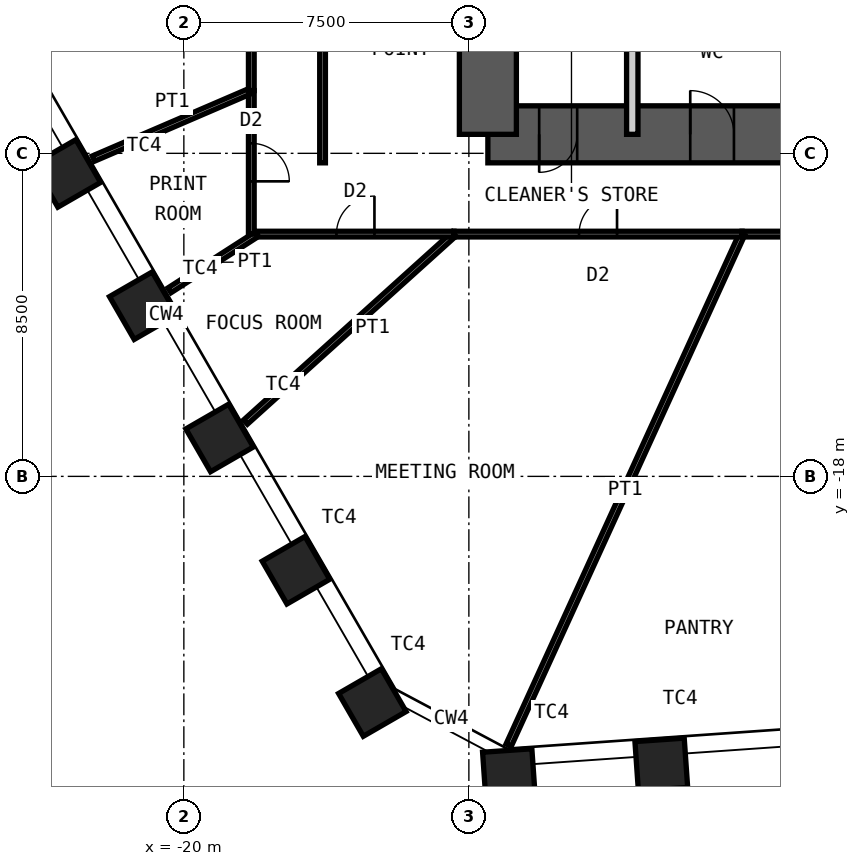
"""IFC4 building model, lengths in metres.
Left out: names, types, materials, properties, quantities, classifications, styles, units other than length and angle.
Written with IfcOpenShell. Run it as: python <this file> out.ifc"""

import sys

from ifc_helpers import new_model, si_unit, direction, frame, frame_2d, origin, origin_2d, place, context, subcontext, project, spatial, rectangle, hollow_rectangle, extrude, element, fill, save


model = new_model("IFC4")
c1 = context("Model", 3, precision=1e-05, world=origin(), true_north=direction((0.0, 1.0)))
c2 = subcontext(c1, "Body", "Model", "MODEL_VIEW")
j1 = project(units=[si_unit("LENGTHUNIT", "METRE"), si_unit("PLANEANGLEUNIT", "RADIAN")], contexts=[c1])
p1 = place(None, origin())
s1 = spatial("IfcSite", under=j1, at=p1, CompositionType="ELEMENT")
p2 = place(p1, origin())
s2 = spatial("IfcBuilding", under=s1, at=p2, CompositionType="ELEMENT")
p3 = place(p2, frame((0.0, 0.0, 161.8)))
s3 = spatial("IfcBuildingStorey", under=s2, at=p3, CompositionType="ELEMENT", Elevation=161.8)
for number, where, z_axis, x_axis in (
    (1, (-7.436, -25.581, 0.0), (0.0, 0.0, 1.0), (0.998, 0.07, 0.0)),
    (2, (-11.446, -25.861, 0.0), (0.0, 0.0, 1.0), (0.998, 0.07, 0.0)),
    (3, (-15.04, -23.95, 0.0), (0.0, 0.0, 1.0), (0.5, -0.866, 0.0)),
    (4, (-17.049, -20.47, 0.0), (0.0, 0.0, 1.0), (0.5, -0.866, 0.0)),
    (5, (-19.059, -16.989, 0.0), (0.0, 0.0, 1.0), (0.5, -0.866, 0.0)),
    (6, (-21.068, -13.509, 0.0), (0.0, 0.0, 1.0), (0.5, -0.866, 0.0)),
    (7, (-23.078, -10.028, 0.0), (0.0, 0.0, 1.0), (0.5, -0.866, 0.0)),
):
    element("IfcColumn", number, at=place(p3, frame(where, z_axis=z_axis, x_axis=x_axis)), inside=s3, PredefinedType="COLUMN", context=c2, shape_type="SweptSolid", body=[
        extrude(hollow_rectangle(XDim=1.3, YDim=1.3, WallThickness=0.1, at=origin_2d()), origin(), (0.0, 0.0, 1.0), 4.2),
    ])
p4 = place(p3, frame((-12.0, -9.0, 0.0), z_axis=(0.0, 0.0, 1.0), x_axis=(1.0, 0.0, 0.0)))
e8 = element("IfcWall", 8, at=p4, inside=s3, PredefinedType="SHEAR", context=c2, shape_type="SweptSolid", body=[
    extrude(rectangle(XDim=24.0, YDim=1.5, at=frame_2d((12.0, 0.0))), origin(), (0.0, 0.0, 1.0), 4.2),
])
p5 = place(p4, frame((1.35, 0.0, 0.0)))
e9 = element("IfcOpeningElement", 9, at=p5, cuts=e8, PredefinedType="OPENING", context=c2, shape_type="SweptSolid", body=[
    extrude(rectangle(XDim=1.0, YDim=2.1, at=frame_2d((0.5, 1.05))), frame((0.0, 0.76, 0.0), z_axis=(0.0, -1.0, 0.0), x_axis=(1.0, 0.0, 0.0)), (0.0, 0.0, 1.0), 1.52),
])
p6 = place(p4, frame((5.325, 0.0, 0.0)))
e10 = element("IfcOpeningElement", 10, at=p6, cuts=e8, PredefinedType="OPENING", context=c2, shape_type="SweptSolid", body=[
    extrude(rectangle(XDim=1.15, YDim=2.1, at=frame_2d((0.575, 1.05))), frame((0.0, 0.76, 0.0), z_axis=(0.0, -1.0, 0.0), x_axis=(1.0, 0.0, 0.0)), (0.0, 0.0, 1.0), 1.52),
])
p7 = place(p4, frame((12.6, 0.0, 0.0)))
e11 = element("IfcOpeningElement", 11, at=p7, cuts=e8, PredefinedType="OPENING", context=c2, shape_type="SweptSolid", body=[
    extrude(rectangle(XDim=1.0, YDim=2.1, at=frame_2d((0.5, 1.05))), frame((0.0, 0.76, 0.0), z_axis=(0.0, -1.0, 0.0), x_axis=(1.0, 0.0, 0.0)), (0.0, 0.0, 1.0), 1.52),
])
p8 = place(p3, frame((-12.0, -9.0, 0.0), z_axis=(0.0, 0.0, 1.0), x_axis=(0.0, 1.0, 0.0)))
e12 = element("IfcWall", 12, at=p8, inside=s3, PredefinedType="SHEAR", context=c2, shape_type="SweptSolid", body=[
    extrude(rectangle(XDim=18.0, YDim=1.5, at=frame_2d((9.0, 0.0))), origin(), (0.0, 0.0, 1.0), 4.2),
])
p9 = place(p8, frame((8.1, 0.0, 0.0)))
e13 = element("IfcOpeningElement", 13, at=p9, cuts=e12, PredefinedType="OPENING", context=c2, shape_type="SweptSolid", body=[
    extrude(rectangle(XDim=1.8, YDim=2.1, at=frame_2d((0.9, 1.05))), frame((0.0, 0.76, 0.0), z_axis=(0.0, -1.0, 0.0), x_axis=(1.0, 0.0, 0.0)), (0.0, 0.0, 1.0), 1.52),
])
p10 = place(p3, frame((-8.2, -9.0, 0.0), z_axis=(0.0, 0.0, 1.0), x_axis=(0.0, 1.0, 0.0)))
e14 = element("IfcWall", 14, at=p10, inside=s3, PredefinedType="PARTITIONING", context=c2, shape_type="SweptSolid", body=[
    extrude(rectangle(XDim=3.85, YDim=0.3, at=frame_2d((1.925, 0.0))), origin(), (0.0, 0.0, 1.0), 3.98),
])
p11 = place(p3, frame((-1.642, -11.625, 0.0), z_axis=(0.0, 0.0, 1.0), x_axis=(-1.0, 0.0, 0.0)))
e15 = element("IfcWall", 15, at=p11, inside=s3, PredefinedType="PARTITIONING", context=c2, shape_type="SweptSolid", body=[
    extrude(rectangle(XDim=3.668, YDim=0.15, at=frame_2d((1.834, 0.0))), origin(), (0.0, 0.0, 1.0), 4.03),
])
p12 = place(p11, frame((1.334, 0.0, 0.0)))
e16 = element("IfcOpeningElement", 16, at=p12, cuts=e15, PredefinedType="OPENING", context=c2, shape_type="SweptSolid", body=[
    extrude(rectangle(XDim=1.0, YDim=2.4, at=frame_2d((0.5, 1.2))), frame((0.0, 0.085, 0.0), z_axis=(0.0, -1.0, 0.0), x_axis=(1.0, 0.0, 0.0)), (0.0, 0.0, 1.0), 0.17),
])
p13 = place(p3, frame((-11.453, -25.072, 0.0), z_axis=(0.0, 0.0, 1.0), x_axis=(0.415494357555, 0.909595755729, 0.0)))
e17 = element("IfcWall", 17, at=p13, inside=s3, PredefinedType="PARTITIONING", context=c2, shape_type="SweptSolid", body=[
    extrude(rectangle(XDim=14.784, YDim=0.15, at=frame_2d((7.392, 0.0))), origin(), (0.0, 0.0, 1.0), 2.93),
])
p14 = place(p3, frame((-5.31, -11.625, 0.0), z_axis=(0.0, 0.0, 1.0), x_axis=(-1.0, 0.0, 0.0)))
e18 = element("IfcWall", 18, at=p14, inside=s3, PredefinedType="PARTITIONING", context=c2, shape_type="SweptSolid", body=[
    extrude(rectangle(XDim=7.582, YDim=0.15, at=frame_2d((3.791, 0.0))), origin(), (0.0, 0.0, 1.0), 4.03),
])
p15 = place(p14, frame((3.291, 0.0, 0.0)))
e19 = element("IfcOpeningElement", 19, at=p15, cuts=e18, PredefinedType="OPENING", context=c2, shape_type="SweptSolid", body=[
    extrude(rectangle(XDim=1.0, YDim=2.4, at=frame_2d((0.5, 1.2))), frame((0.0, 0.085, 0.0), z_axis=(0.0, -1.0, 0.0), x_axis=(1.0, 0.0, 0.0)), (0.0, 0.0, 1.0), 0.17),
])
p16 = place(p3, frame((-18.378, -16.572, 0.0), z_axis=(0.0, 0.0, 1.0), x_axis=(0.742666079924, 0.669661924951, 0.0)))
e20 = element("IfcWall", 20, at=p16, inside=s3, PredefinedType="PARTITIONING", context=c2, shape_type="SweptSolid", body=[
    extrude(rectangle(XDim=7.387, YDim=0.15, at=frame_2d((3.694, 0.0))), origin(), (0.0, 0.0, 1.0), 3.28),
])
p17 = place(p3, frame((-12.892, -11.625, 0.0), z_axis=(0.0, 0.0, 1.0), x_axis=(-1.0, 0.0, 0.0)))
e21 = element("IfcWall", 21, at=p17, inside=s3, PredefinedType="PARTITIONING", context=c2, shape_type="SweptSolid", body=[
    extrude(rectangle(XDim=5.185, YDim=0.15, at=frame_2d((2.593, 0.0))), origin(), (0.0, 0.0, 1.0), 4.03),
])
p18 = place(p17, frame((2.093, 0.0, 0.0)))
e22 = element("IfcOpeningElement", 22, at=p18, cuts=e21, PredefinedType="OPENING", context=c2, shape_type="SweptSolid", body=[
    extrude(rectangle(XDim=1.0, YDim=2.4, at=frame_2d((0.5, 1.2))), frame((0.0, 0.085, 0.0), z_axis=(0.0, -1.0, 0.0), x_axis=(1.0, 0.0, 0.0)), (0.0, 0.0, 1.0), 0.17),
])
p19 = place(p3, frame((-20.378, -13.104, 0.0), z_axis=(0.0, 0.0, 1.0), x_axis=(0.841108871346, 0.540865848934, 0.0)))
e23 = element("IfcWall", 23, at=p19, inside=s3, PredefinedType="PARTITIONING", context=c2, shape_type="SweptSolid", body=[
    extrude(rectangle(XDim=2.735, YDim=0.15, at=frame_2d((1.368, 0.0))), origin(), (0.0, 0.0, 1.0), 3.28),
])
p20 = place(p3, frame((-18.225, -11.625, 0.0), z_axis=(0.0, 0.0, 1.0), x_axis=(0.0, 1.0, 0.0)))
e24 = element("IfcWall", 24, at=p20, inside=s3, PredefinedType="PARTITIONING", context=c2, shape_type="SweptSolid", body=[
    extrude(rectangle(XDim=3.776, YDim=0.15, at=frame_2d((1.888, 0.0))), origin(), (0.0, 0.0, 1.0), 4.03),
])
p21 = place(p20, frame((1.388, 0.0, 0.0)))
e25 = element("IfcOpeningElement", 25, at=p21, cuts=e24, PredefinedType="OPENING", context=c2, shape_type="SweptSolid", body=[
    extrude(rectangle(XDim=1.0, YDim=2.4, at=frame_2d((0.5, 1.2))), frame((0.0, 0.085, 0.0), z_axis=(0.0, -1.0, 0.0), x_axis=(1.0, 0.0, 0.0)), (0.0, 0.0, 1.0), 0.17),
])
p22 = place(p3, frame((-22.38, -9.638, 0.0), z_axis=(0.0, 0.0, 1.0), x_axis=(0.918428905659, 0.395586078181, 0.0)))
e26 = element("IfcWall", 26, at=p22, inside=s3, PredefinedType="PARTITIONING", context=c2, shape_type="SweptSolid", body=[
    extrude(rectangle(XDim=4.524, YDim=0.15, at=frame_2d((2.262, 0.0))), origin(), (0.0, 0.0, 1.0), 3.28),
])
p23 = place(p3, frame((-18.225, -7.849, 0.0), z_axis=(0.0, 0.0, 1.0), x_axis=(0.0, 1.0, 0.0)))
e27 = element("IfcWall", 27, at=p23, inside=s3, PredefinedType="PARTITIONING", context=c2, shape_type="SweptSolid", body=[
    extrude(rectangle(XDim=17.845, YDim=0.15, at=frame_2d((8.922, 0.0))), origin(), (0.0, 0.0, 1.0), 4.03),
])
p24 = place(p23, frame((8.022, 0.0, 0.0)))
e28 = element("IfcOpeningElement", 28, at=p24, cuts=e27, PredefinedType="OPENING", context=c2, shape_type="SweptSolid", body=[
    extrude(rectangle(XDim=1.8, YDim=2.4, at=frame_2d((0.9, 1.2))), frame((0.0, 0.085, 0.0), z_axis=(0.0, -1.0, 0.0), x_axis=(1.0, 0.0, 0.0)), (0.0, 0.0, 1.0), 0.17),
])
p25 = place(p3, frame((-16.35, -9.75, 0.0), z_axis=(0.0, 0.0, 1.0), x_axis=(0.0, 1.0, 0.0)))
e29 = element("IfcWall", 29, at=p25, inside=s3, PredefinedType="PARTITIONING", context=c2, shape_type="SweptSolid", body=[
    extrude(rectangle(XDim=7.25, YDim=0.15, at=frame_2d((3.625, 0.0))), origin(), (0.0, 0.0, 1.0), 4.03),
])
p26 = place(p5, origin())
e30 = element("IfcDoor", 30, at=p26, inside=s3, OperationType="SINGLE_SWING_LEFT", PredefinedType="DOOR", context=c2, shape_type="SweptSolid", body=[
    extrude(rectangle(XDim=1.0, YDim=2.1, at=frame_2d((0.5, 1.05))), frame((0.0, 0.025, 0.0), z_axis=(0.0, -1.0, 0.0), x_axis=(1.0, 0.0, 0.0)), (0.0, 0.0, 1.0), 0.05),
])
fill(e9, e30)
p27 = place(p6, origin())
e31 = element("IfcDoor", 31, at=p27, inside=s3, OperationType="SINGLE_SWING_RIGHT", PredefinedType="DOOR", context=c2, shape_type="SweptSolid", body=[
    extrude(rectangle(XDim=1.15, YDim=2.1, at=frame_2d((0.575, 1.05))), frame((0.0, 0.025, 0.0), z_axis=(0.0, -1.0, 0.0), x_axis=(1.0, 0.0, 0.0)), (0.0, 0.0, 1.0), 0.05),
])
fill(e10, e31)
p28 = place(p15, origin())
e32 = element("IfcDoor", 32, at=p28, inside=s3, OperationType="SINGLE_SWING_LEFT", PredefinedType="DOOR", context=c2, shape_type="SweptSolid", body=[
    extrude(rectangle(XDim=1.0, YDim=2.4, at=frame_2d((0.5, 1.2))), frame((0.0, 0.025, 0.0), z_axis=(0.0, -1.0, 0.0), x_axis=(1.0, 0.0, 0.0)), (0.0, 0.0, 1.0), 0.05),
])
fill(e19, e32)
p29 = place(p18, origin())
e33 = element("IfcDoor", 33, at=p29, inside=s3, OperationType="SINGLE_SWING_LEFT", PredefinedType="DOOR", context=c2, shape_type="SweptSolid", body=[
    extrude(rectangle(XDim=1.0, YDim=2.4, at=frame_2d((0.5, 1.2))), frame((0.0, 0.025, 0.0), z_axis=(0.0, -1.0, 0.0), x_axis=(1.0, 0.0, 0.0)), (0.0, 0.0, 1.0), 0.05),
])
fill(e22, e33)
p30 = place(p21, origin())
e34 = element("IfcDoor", 34, at=p30, inside=s3, OperationType="SINGLE_SWING_LEFT", PredefinedType="DOOR", context=c2, shape_type="SweptSolid", body=[
    extrude(rectangle(XDim=1.0, YDim=2.4, at=frame_2d((0.5, 1.2))), frame((0.0, 0.025, 0.0), z_axis=(0.0, -1.0, 0.0), x_axis=(1.0, 0.0, 0.0)), (0.0, 0.0, 1.0), 0.05),
])
fill(e25, e34)
save(model, sys.argv[1])
